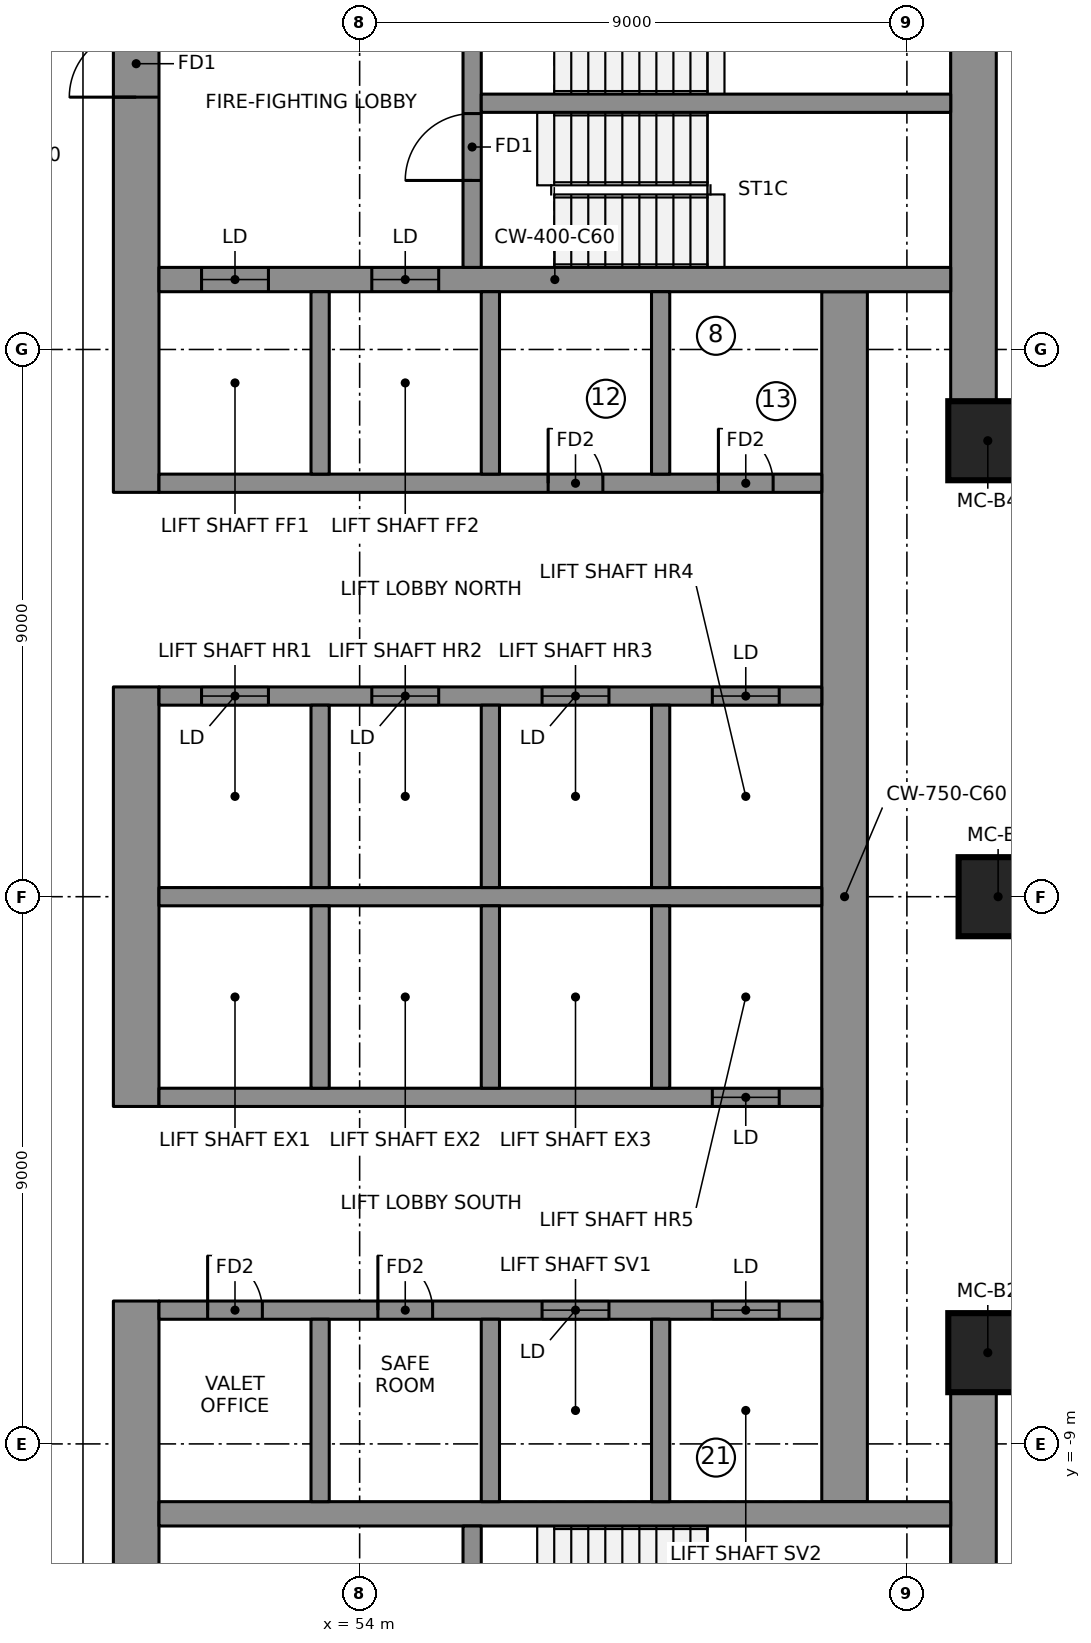
"""IFC4 building model, lengths in metres.
Left out: names, types, materials, properties, quantities, classifications, styles, units other than length and angle.
Written with IfcOpenShell. Run it as: python <this file> out.ifc"""

import sys

from ifc_helpers import new_model, si_unit, direction, frame, frame_2d, origin, origin_2d, place, context, subcontext, project, spatial, rectangle, extrude, element, fill, save


model = new_model("IFC4")
c1 = context("Model", 3, precision=1e-05, world=origin(), true_north=direction((0.0, 1.0)))
c2 = subcontext(c1, "Body", "Model", "MODEL_VIEW")
j1 = project(units=[si_unit("LENGTHUNIT", "METRE"), si_unit("PLANEANGLEUNIT", "RADIAN")], contexts=[c1])
p1 = place(None, origin())
s1 = spatial("IfcSite", under=j1, at=p1, CompositionType="ELEMENT")
p2 = place(p1, origin())
s2 = spatial("IfcBuilding", under=s1, at=p2, CompositionType="ELEMENT")
p3 = place(p2, frame((0.0, 0.0, 207.45)))
s3 = spatial("IfcBuildingStorey", under=s2, at=p3, CompositionType="ELEMENT", Elevation=207.45)
p4 = place(p3, frame((50.325, 6.65, 0.0), z_axis=(0.0, 0.0, 1.0), x_axis=(0.0, 1.0, 0.0)))
e1 = element("IfcWall", 1, at=p4, inside=s3, PredefinedType="SHEAR", context=c2, shape_type="SweptSolid", body=[
    extrude(rectangle(XDim=9.85, YDim=0.75, at=frame_2d((4.925, 0.0))), origin(), (0.0, 0.0, 1.0), 3.55),
])
p5 = place(p4, frame((6.5, 0.0, 0.0)))
e2 = element("IfcOpeningElement", 2, at=p5, cuts=e1, PredefinedType="OPENING", context=c2, shape_type="SweptSolid", body=[
    extrude(rectangle(XDim=1.1, YDim=2.1, at=frame_2d((0.55, 1.05))), frame((0.0, 0.385, 0.0), z_axis=(0.0, -1.0, 0.0), x_axis=(1.0, 0.0, 0.0)), (0.0, 0.0, 1.0), 0.77),
])
p6 = place(p3, frame((50.325, -3.45, 0.0), z_axis=(0.0, 0.0, 1.0), x_axis=(0.0, 1.0, 0.0)))
e3 = element("IfcWall", 3, at=p6, inside=s3, PredefinedType="SHEAR", context=c2, shape_type="SweptSolid", body=[
    extrude(rectangle(XDim=6.9, YDim=0.75, at=frame_2d((3.45, 0.0))), origin(), (0.0, 0.0, 1.0), 3.55),
])
p7 = place(p3, frame((50.325, -16.5, 0.0), z_axis=(0.0, 0.0, 1.0), x_axis=(0.0, 1.0, 0.0)))
e4 = element("IfcWall", 4, at=p7, inside=s3, PredefinedType="SHEAR", context=c2, shape_type="SweptSolid", body=[
    extrude(rectangle(XDim=9.85, YDim=0.75, at=frame_2d((4.925, 0.0))), origin(), (0.0, 0.0, 1.0), 3.55),
])
p8 = place(p7, frame((2.25, 0.0, 0.0)))
e5 = element("IfcOpeningElement", 5, at=p8, cuts=e4, PredefinedType="OPENING", context=c2, shape_type="SweptSolid", body=[
    extrude(rectangle(XDim=1.1, YDim=2.1, at=frame_2d((0.55, 1.05))), frame((0.0, 0.385, 0.0), z_axis=(0.0, -1.0, 0.0), x_axis=(1.0, 0.0, 0.0)), (0.0, 0.0, 1.0), 0.77),
])
for number, where, z_axis, x_axis in (
    (6, (64.095, 8.099, 0.0), (0.0, 0.0, 1.0), (0.0, 1.0, 0.0)),
    (7, (64.095, -15.75, 0.0), (0.0, 0.0, 1.0), (0.0, 1.0, 0.0)),
):
    element("IfcWall", number, at=place(p3, frame(where, z_axis=z_axis, x_axis=x_axis)), inside=s3, PredefinedType="SHEAR", context=c2, shape_type="SweptSolid", body=[
        extrude(rectangle(XDim=7.651, YDim=0.75, at=frame_2d((3.825, 0.0))), origin(), (0.0, 0.0, 1.0), 3.55),
    ])
p9 = place(p3, frame((61.975, -9.95, 0.0), z_axis=(0.0, 0.0, 1.0), x_axis=(0.0, 1.0, 0.0)))
e8 = element("IfcWall", 8, at=p9, inside=s3, PredefinedType="SHEAR", context=c2, shape_type="SweptSolid", body=[
    extrude(rectangle(XDim=19.9, YDim=0.75, at=frame_2d((9.95, 0.0))), origin(), (0.0, 0.0, 1.0), 3.55),
])
p10 = place(p3, frame((50.7, 10.15, 0.0), z_axis=(0.0, 0.0, 1.0), x_axis=(1.0, 0.0, 0.0)))
e9 = element("IfcWall", 9, at=p10, inside=s3, PredefinedType="SHEAR", context=c2, shape_type="SweptSolid", body=[
    extrude(rectangle(XDim=13.02, YDim=0.4, at=frame_2d((6.51, 0.0))), origin(), (0.0, 0.0, 1.0), 3.55),
])
p11 = place(p10, frame((0.7, 0.0, 0.0)))
e10 = element("IfcOpeningElement", 10, at=p11, cuts=e9, PredefinedType="OPENING", context=c2, shape_type="SweptSolid", body=[
    extrude(rectangle(XDim=1.1, YDim=2.1, at=frame_2d((0.55, 1.05))), frame((0.0, 0.21, 0.0), z_axis=(0.0, -1.0, 0.0), x_axis=(1.0, 0.0, 0.0)), (0.0, 0.0, 1.0), 0.42),
])
p12 = place(p10, frame((3.5, 0.0, 0.0)))
e11 = element("IfcOpeningElement", 11, at=p12, cuts=e9, PredefinedType="OPENING", context=c2, shape_type="SweptSolid", body=[
    extrude(rectangle(XDim=1.1, YDim=2.1, at=frame_2d((0.55, 1.05))), frame((0.0, 0.21, 0.0), z_axis=(0.0, -1.0, 0.0), x_axis=(1.0, 0.0, 0.0)), (0.0, 0.0, 1.0), 0.42),
])
p13 = place(p3, frame((50.7, -10.15, 0.0), z_axis=(0.0, 0.0, 1.0), x_axis=(1.0, 0.0, 0.0)))
e12 = element("IfcWall", 12, at=p13, inside=s3, PredefinedType="SHEAR", context=c2, shape_type="SweptSolid", body=[
    extrude(rectangle(XDim=13.02, YDim=0.4, at=frame_2d((6.51, 0.0))), origin(), (0.0, 0.0, 1.0), 3.55),
])
p14 = place(p3, frame((50.7, 0.0, 0.0), z_axis=(0.0, 0.0, 1.0), x_axis=(1.0, 0.0, 0.0)))
e13 = element("IfcWall", 13, at=p14, inside=s3, PredefinedType="SHEAR", context=c2, shape_type="SweptSolid", body=[
    extrude(rectangle(XDim=10.9, YDim=0.3, at=frame_2d((5.45, 0.0))), origin(), (0.0, 0.0, 1.0), 3.55),
])
p15 = place(p3, frame((50.7, 3.3, 0.0), z_axis=(0.0, 0.0, 1.0), x_axis=(1.0, 0.0, 0.0)))
e14 = element("IfcWall", 14, at=p15, inside=s3, PredefinedType="SHEAR", context=c2, shape_type="SweptSolid", body=[
    extrude(rectangle(XDim=10.9, YDim=0.3, at=frame_2d((5.45, 0.0))), origin(), (0.0, 0.0, 1.0), 3.55),
])
p16 = place(p15, frame((0.7, 0.0, 0.0)))
e15 = element("IfcOpeningElement", 15, at=p16, cuts=e14, PredefinedType="OPENING", context=c2, shape_type="SweptSolid", body=[
    extrude(rectangle(XDim=1.1, YDim=2.1, at=frame_2d((0.55, 1.05))), frame((0.0, 0.16, 0.0), z_axis=(0.0, -1.0, 0.0), x_axis=(1.0, 0.0, 0.0)), (0.0, 0.0, 1.0), 0.32),
])
p17 = place(p15, frame((3.5, 0.0, 0.0)))
e16 = element("IfcOpeningElement", 16, at=p17, cuts=e14, PredefinedType="OPENING", context=c2, shape_type="SweptSolid", body=[
    extrude(rectangle(XDim=1.1, YDim=2.1, at=frame_2d((0.55, 1.05))), frame((0.0, 0.16, 0.0), z_axis=(0.0, -1.0, 0.0), x_axis=(1.0, 0.0, 0.0)), (0.0, 0.0, 1.0), 0.32),
])
p18 = place(p15, frame((6.3, 0.0, 0.0)))
e17 = element("IfcOpeningElement", 17, at=p18, cuts=e14, PredefinedType="OPENING", context=c2, shape_type="SweptSolid", body=[
    extrude(rectangle(XDim=1.1, YDim=2.1, at=frame_2d((0.55, 1.05))), frame((0.0, 0.16, 0.0), z_axis=(0.0, -1.0, 0.0), x_axis=(1.0, 0.0, 0.0)), (0.0, 0.0, 1.0), 0.32),
])
p19 = place(p15, frame((9.1, 0.0, 0.0)))
e18 = element("IfcOpeningElement", 18, at=p19, cuts=e14, PredefinedType="OPENING", context=c2, shape_type="SweptSolid", body=[
    extrude(rectangle(XDim=1.1, YDim=2.1, at=frame_2d((0.55, 1.05))), frame((0.0, 0.16, 0.0), z_axis=(0.0, -1.0, 0.0), x_axis=(1.0, 0.0, 0.0)), (0.0, 0.0, 1.0), 0.32),
])
p20 = place(p3, frame((50.7, 6.8, 0.0), z_axis=(0.0, 0.0, 1.0), x_axis=(1.0, 0.0, 0.0)))
e19 = element("IfcWall", 19, at=p20, inside=s3, PredefinedType="SHEAR", context=c2, shape_type="SweptSolid", body=[
    extrude(rectangle(XDim=10.9, YDim=0.3, at=frame_2d((5.45, 0.0))), origin(), (0.0, 0.0, 1.0), 3.55),
])
p21 = place(p20, frame((6.4, 0.0, 0.0)))
e20 = element("IfcOpeningElement", 20, at=p21, cuts=e19, PredefinedType="OPENING", context=c2, shape_type="SweptSolid", body=[
    extrude(rectangle(XDim=0.9, YDim=2.1, at=frame_2d((0.45, 1.05))), frame((0.0, 0.16, 0.0), z_axis=(0.0, -1.0, 0.0), x_axis=(1.0, 0.0, 0.0)), (0.0, 0.0, 1.0), 0.32),
])
p22 = place(p20, frame((9.2, 0.0, 0.0)))
e21 = element("IfcOpeningElement", 21, at=p22, cuts=e19, PredefinedType="OPENING", context=c2, shape_type="SweptSolid", body=[
    extrude(rectangle(XDim=0.9, YDim=2.1, at=frame_2d((0.45, 1.05))), frame((0.0, 0.16, 0.0), z_axis=(0.0, -1.0, 0.0), x_axis=(1.0, 0.0, 0.0)), (0.0, 0.0, 1.0), 0.32),
])
for number, where, z_axis, x_axis in (
    (22, (53.35, 0.15, 0.0), (0.0, 0.0, 1.0), (0.0, 1.0, 0.0)),
    (23, (53.35, 6.95, 0.0), (0.0, 0.0, 1.0), (0.0, 1.0, 0.0)),
    (24, (56.15, 0.15, 0.0), (0.0, 0.0, 1.0), (0.0, 1.0, 0.0)),
    (25, (56.15, 6.95, 0.0), (0.0, 0.0, 1.0), (0.0, 1.0, 0.0)),
    (26, (58.95, 0.15, 0.0), (0.0, 0.0, 1.0), (0.0, 1.0, 0.0)),
    (27, (58.95, 6.95, 0.0), (0.0, 0.0, 1.0), (0.0, 1.0, 0.0)),
):
    element("IfcWall", number, at=place(p3, frame(where, z_axis=z_axis, x_axis=x_axis)), inside=s3, PredefinedType="SHEAR", context=c2, shape_type="SweptSolid", body=[
        extrude(rectangle(XDim=3.0, YDim=0.3, at=frame_2d((1.5, 0.0))), origin(), (0.0, 0.0, 1.0), 3.55),
    ])
p23 = place(p3, frame((50.7, -3.3, 0.0), z_axis=(0.0, 0.0, 1.0), x_axis=(1.0, 0.0, 0.0)))
e28 = element("IfcWall", 28, at=p23, inside=s3, PredefinedType="SHEAR", context=c2, shape_type="SweptSolid", body=[
    extrude(rectangle(XDim=10.9, YDim=0.3, at=frame_2d((5.45, 0.0))), origin(), (0.0, 0.0, 1.0), 3.55),
])
p24 = place(p23, frame((9.1, 0.0, 0.0)))
e29 = element("IfcOpeningElement", 29, at=p24, cuts=e28, PredefinedType="OPENING", context=c2, shape_type="SweptSolid", body=[
    extrude(rectangle(XDim=1.1, YDim=2.1, at=frame_2d((0.55, 1.05))), frame((0.0, 0.16, 0.0), z_axis=(0.0, -1.0, 0.0), x_axis=(1.0, 0.0, 0.0)), (0.0, 0.0, 1.0), 0.32),
])
p25 = place(p3, frame((50.7, -6.8, 0.0), z_axis=(0.0, 0.0, 1.0), x_axis=(1.0, 0.0, 0.0)))
e30 = element("IfcWall", 30, at=p25, inside=s3, PredefinedType="SHEAR", context=c2, shape_type="SweptSolid", body=[
    extrude(rectangle(XDim=10.9, YDim=0.3, at=frame_2d((5.45, 0.0))), origin(), (0.0, 0.0, 1.0), 3.55),
])
p26 = place(p25, frame((6.3, 0.0, 0.0)))
e31 = element("IfcOpeningElement", 31, at=p26, cuts=e30, PredefinedType="OPENING", context=c2, shape_type="SweptSolid", body=[
    extrude(rectangle(XDim=1.1, YDim=2.1, at=frame_2d((0.55, 1.05))), frame((0.0, 0.16, 0.0), z_axis=(0.0, -1.0, 0.0), x_axis=(1.0, 0.0, 0.0)), (0.0, 0.0, 1.0), 0.32),
])
p27 = place(p25, frame((9.1, 0.0, 0.0)))
e32 = element("IfcOpeningElement", 32, at=p27, cuts=e30, PredefinedType="OPENING", context=c2, shape_type="SweptSolid", body=[
    extrude(rectangle(XDim=1.1, YDim=2.1, at=frame_2d((0.55, 1.05))), frame((0.0, 0.16, 0.0), z_axis=(0.0, -1.0, 0.0), x_axis=(1.0, 0.0, 0.0)), (0.0, 0.0, 1.0), 0.32),
])
p28 = place(p25, frame((0.8, 0.0, 0.0)))
e33 = element("IfcOpeningElement", 33, at=p28, cuts=e30, PredefinedType="OPENING", context=c2, shape_type="SweptSolid", body=[
    extrude(rectangle(XDim=0.9, YDim=2.1, at=frame_2d((0.45, 1.05))), frame((0.0, 0.16, 0.0), z_axis=(0.0, -1.0, 0.0), x_axis=(1.0, 0.0, 0.0)), (0.0, 0.0, 1.0), 0.32),
])
p29 = place(p25, frame((3.6, 0.0, 0.0)))
e34 = element("IfcOpeningElement", 34, at=p29, cuts=e30, PredefinedType="OPENING", context=c2, shape_type="SweptSolid", body=[
    extrude(rectangle(XDim=0.9, YDim=2.1, at=frame_2d((0.45, 1.05))), frame((0.0, 0.16, 0.0), z_axis=(0.0, -1.0, 0.0), x_axis=(1.0, 0.0, 0.0)), (0.0, 0.0, 1.0), 0.32),
])
for number, where, z_axis, x_axis in (
    (35, (53.35, -3.15, 0.0), (0.0, 0.0, 1.0), (0.0, 1.0, 0.0)),
    (36, (53.35, -9.95, 0.0), (0.0, 0.0, 1.0), (0.0, 1.0, 0.0)),
    (37, (56.15, -3.15, 0.0), (0.0, 0.0, 1.0), (0.0, 1.0, 0.0)),
    (38, (56.15, -9.95, 0.0), (0.0, 0.0, 1.0), (0.0, 1.0, 0.0)),
    (39, (58.95, -3.15, 0.0), (0.0, 0.0, 1.0), (0.0, 1.0, 0.0)),
    (40, (58.95, -9.95, 0.0), (0.0, 0.0, 1.0), (0.0, 1.0, 0.0)),
):
    element("IfcWall", number, at=place(p3, frame(where, z_axis=z_axis, x_axis=x_axis)), inside=s3, PredefinedType="SHEAR", context=c2, shape_type="SweptSolid", body=[
        extrude(rectangle(XDim=3.0, YDim=0.3, at=frame_2d((1.5, 0.0))), origin(), (0.0, 0.0, 1.0), 3.55),
    ])
p30 = place(p3, frame((55.85, 10.35, 0.0), z_axis=(0.0, 0.0, 1.0), x_axis=(0.0, 1.0, 0.0)))
e41 = element("IfcWall", 41, at=p30, inside=s3, PredefinedType="SHEAR", context=c2, shape_type="SweptSolid", body=[
    extrude(rectangle(XDim=5.4, YDim=0.3, at=frame_2d((2.7, 0.0))), origin(), (0.0, 0.0, 1.0), 3.55),
])
p31 = place(p30, frame((1.43, 0.0, 0.0)))
e42 = element("IfcOpeningElement", 42, at=p31, cuts=e41, PredefinedType="OPENING", context=c2, shape_type="SweptSolid", body=[
    extrude(rectangle(XDim=1.1, YDim=2.1, at=frame_2d((0.55, 1.05))), frame((0.0, 0.16, 0.0), z_axis=(0.0, -1.0, 0.0), x_axis=(1.0, 0.0, 0.0)), (0.0, 0.0, 1.0), 0.32),
])
p32 = place(p30, frame((3.6, 0.0, 0.0)))
e43 = element("IfcOpeningElement", 43, at=p32, cuts=e41, PredefinedType="OPENING", context=c2, shape_type="SweptSolid", body=[
    extrude(rectangle(XDim=1.1, YDim=2.1, at=frame_2d((0.55, 1.05))), frame((0.0, 0.16, 0.0), z_axis=(0.0, -1.0, 0.0), x_axis=(1.0, 0.0, 0.0)), (0.0, 0.0, 1.0), 0.32),
])
p33 = place(p3, frame((55.85, -15.75, 0.0), z_axis=(0.0, 0.0, 1.0), x_axis=(0.0, 1.0, 0.0)))
e44 = element("IfcWall", 44, at=p33, inside=s3, PredefinedType="SHEAR", context=c2, shape_type="SweptSolid", body=[
    extrude(rectangle(XDim=5.4, YDim=0.3, at=frame_2d((2.7, 0.0))), origin(), (0.0, 0.0, 1.0), 3.55),
])
p34 = place(p33, frame((3.6, 0.0, 0.0)))
e45 = element("IfcOpeningElement", 45, at=p34, cuts=e44, PredefinedType="OPENING", context=c2, shape_type="SweptSolid", body=[
    extrude(rectangle(XDim=1.1, YDim=2.1, at=frame_2d((0.55, 1.05))), frame((0.0, 0.16, 0.0), z_axis=(0.0, -1.0, 0.0), x_axis=(1.0, 0.0, 0.0)), (0.0, 0.0, 1.0), 0.32),
])
p35 = place(p33, frame((0.8, 0.0, 0.0)))
e46 = element("IfcOpeningElement", 46, at=p35, cuts=e44, PredefinedType="OPENING", context=c2, shape_type="SweptSolid", body=[
    extrude(rectangle(XDim=0.9, YDim=2.1, at=frame_2d((0.45, 1.05))), frame((0.0, 0.16, 0.0), z_axis=(0.0, -1.0, 0.0), x_axis=(1.0, 0.0, 0.0)), (0.0, 0.0, 1.0), 0.32),
])
p36 = place(p3, frame((56.0, 13.05, 0.0), z_axis=(0.0, 0.0, 1.0), x_axis=(1.0, 0.0, 0.0)))
e47 = element("IfcWall", 47, at=p36, inside=s3, PredefinedType="SHEAR", context=c2, shape_type="SweptSolid", body=[
    extrude(rectangle(XDim=7.72, YDim=0.3, at=frame_2d((3.86, 0.0))), origin(), (0.0, 0.0, 1.0), 3.55),
])
for number, where, z_axis, x_axis in (
    (48, (64.33, -7.499, 0.0), (0.0, 0.0, 1.0), (1.0, 0.0, 0.0)),
    (49, (64.5, 0.0, 0.0), (0.0, 0.0, 1.0), (1.0, 0.0, 0.0)),
    (50, (64.33, 7.499, 0.0), (0.0, 0.0, 1.0), (1.0, 0.0, 0.0)),
):
    element("IfcColumn", number, at=place(p3, frame(where, z_axis=z_axis, x_axis=x_axis)), inside=s3, PredefinedType="COLUMN", context=c2, shape_type="SweptSolid", body=[
        extrude(rectangle(XDim=1.3, YDim=1.3, at=origin_2d()), origin(), (0.0, 0.0, 1.0), 3.55),
    ])
p37 = place(p11, origin())
e51 = element("IfcDoor", 51, at=p37, inside=s3, OperationType="DOUBLE_DOOR_SLIDING", PredefinedType="DOOR", context=c2, shape_type="SweptSolid", body=[
    extrude(rectangle(XDim=1.1, YDim=2.1, at=frame_2d((0.55, 1.05))), frame((0.0, 0.025, 0.0), z_axis=(0.0, -1.0, 0.0), x_axis=(1.0, 0.0, 0.0)), (0.0, 0.0, 1.0), 0.05),
])
fill(e10, e51)
p38 = place(p12, origin())
e52 = element("IfcDoor", 52, at=p38, inside=s3, OperationType="DOUBLE_DOOR_SLIDING", PredefinedType="DOOR", context=c2, shape_type="SweptSolid", body=[
    extrude(rectangle(XDim=1.1, YDim=2.1, at=frame_2d((0.55, 1.05))), frame((0.0, 0.025, 0.0), z_axis=(0.0, -1.0, 0.0), x_axis=(1.0, 0.0, 0.0)), (0.0, 0.0, 1.0), 0.05),
])
fill(e11, e52)
p39 = place(p16, origin())
e53 = element("IfcDoor", 53, at=p39, inside=s3, OperationType="DOUBLE_DOOR_SLIDING", PredefinedType="DOOR", context=c2, shape_type="SweptSolid", body=[
    extrude(rectangle(XDim=1.1, YDim=2.1, at=frame_2d((0.55, 1.05))), frame((0.0, 0.025, 0.0), z_axis=(0.0, -1.0, 0.0), x_axis=(1.0, 0.0, 0.0)), (0.0, 0.0, 1.0), 0.05),
])
fill(e15, e53)
p40 = place(p17, origin())
e54 = element("IfcDoor", 54, at=p40, inside=s3, OperationType="DOUBLE_DOOR_SLIDING", PredefinedType="DOOR", context=c2, shape_type="SweptSolid", body=[
    extrude(rectangle(XDim=1.1, YDim=2.1, at=frame_2d((0.55, 1.05))), frame((0.0, 0.025, 0.0), z_axis=(0.0, -1.0, 0.0), x_axis=(1.0, 0.0, 0.0)), (0.0, 0.0, 1.0), 0.05),
])
fill(e16, e54)
p41 = place(p18, origin())
e55 = element("IfcDoor", 55, at=p41, inside=s3, OperationType="DOUBLE_DOOR_SLIDING", PredefinedType="DOOR", context=c2, shape_type="SweptSolid", body=[
    extrude(rectangle(XDim=1.1, YDim=2.1, at=frame_2d((0.55, 1.05))), frame((0.0, 0.025, 0.0), z_axis=(0.0, -1.0, 0.0), x_axis=(1.0, 0.0, 0.0)), (0.0, 0.0, 1.0), 0.05),
])
fill(e17, e55)
p42 = place(p19, origin())
e56 = element("IfcDoor", 56, at=p42, inside=s3, OperationType="DOUBLE_DOOR_SLIDING", PredefinedType="DOOR", context=c2, shape_type="SweptSolid", body=[
    extrude(rectangle(XDim=1.1, YDim=2.1, at=frame_2d((0.55, 1.05))), frame((0.0, 0.025, 0.0), z_axis=(0.0, -1.0, 0.0), x_axis=(1.0, 0.0, 0.0)), (0.0, 0.0, 1.0), 0.05),
])
fill(e18, e56)
p43 = place(p24, origin())
e57 = element("IfcDoor", 57, at=p43, inside=s3, OperationType="DOUBLE_DOOR_SLIDING", PredefinedType="DOOR", context=c2, shape_type="SweptSolid", body=[
    extrude(rectangle(XDim=1.1, YDim=2.1, at=frame_2d((0.55, 1.05))), frame((0.0, 0.025, 0.0), z_axis=(0.0, -1.0, 0.0), x_axis=(1.0, 0.0, 0.0)), (0.0, 0.0, 1.0), 0.05),
])
fill(e29, e57)
p44 = place(p26, origin())
e58 = element("IfcDoor", 58, at=p44, inside=s3, OperationType="DOUBLE_DOOR_SLIDING", PredefinedType="DOOR", context=c2, shape_type="SweptSolid", body=[
    extrude(rectangle(XDim=1.1, YDim=2.1, at=frame_2d((0.55, 1.05))), frame((0.0, 0.025, 0.0), z_axis=(0.0, -1.0, 0.0), x_axis=(1.0, 0.0, 0.0)), (0.0, 0.0, 1.0), 0.05),
])
fill(e31, e58)
p45 = place(p27, origin())
e59 = element("IfcDoor", 59, at=p45, inside=s3, OperationType="DOUBLE_DOOR_SLIDING", PredefinedType="DOOR", context=c2, shape_type="SweptSolid", body=[
    extrude(rectangle(XDim=1.1, YDim=2.1, at=frame_2d((0.55, 1.05))), frame((0.0, 0.025, 0.0), z_axis=(0.0, -1.0, 0.0), x_axis=(1.0, 0.0, 0.0)), (0.0, 0.0, 1.0), 0.05),
])
fill(e32, e59)
p46 = place(p31, origin())
e60 = element("IfcDoor", 60, at=p46, inside=s3, OperationType="SINGLE_SWING_RIGHT", PredefinedType="DOOR", context=c2, shape_type="SweptSolid", body=[
    extrude(rectangle(XDim=1.1, YDim=2.1, at=frame_2d((0.55, 1.05))), frame((0.0, 0.025, 0.0), z_axis=(0.0, -1.0, 0.0), x_axis=(1.0, 0.0, 0.0)), (0.0, 0.0, 1.0), 0.05),
])
fill(e42, e60)
p47 = place(p5, origin())
e61 = element("IfcDoor", 61, at=p47, inside=s3, OperationType="SINGLE_SWING_RIGHT", PredefinedType="DOOR", context=c2, shape_type="SweptSolid", body=[
    extrude(rectangle(XDim=1.1, YDim=2.1, at=frame_2d((0.55, 1.05))), frame((0.0, 0.025, 0.0), z_axis=(0.0, -1.0, 0.0), x_axis=(1.0, 0.0, 0.0)), (0.0, 0.0, 1.0), 0.05),
])
fill(e2, e61)
p48 = place(p21, origin())
e62 = element("IfcDoor", 62, at=p48, inside=s3, OperationType="SINGLE_SWING_LEFT", PredefinedType="DOOR", context=c2, shape_type="SweptSolid", body=[
    extrude(rectangle(XDim=0.9, YDim=2.1, at=frame_2d((0.45, 1.05))), frame((0.0, 0.025, 0.0), z_axis=(0.0, -1.0, 0.0), x_axis=(1.0, 0.0, 0.0)), (0.0, 0.0, 1.0), 0.05),
])
fill(e20, e62)
p49 = place(p22, origin())
e63 = element("IfcDoor", 63, at=p49, inside=s3, OperationType="SINGLE_SWING_LEFT", PredefinedType="DOOR", context=c2, shape_type="SweptSolid", body=[
    extrude(rectangle(XDim=0.9, YDim=2.1, at=frame_2d((0.45, 1.05))), frame((0.0, 0.025, 0.0), z_axis=(0.0, -1.0, 0.0), x_axis=(1.0, 0.0, 0.0)), (0.0, 0.0, 1.0), 0.05),
])
fill(e21, e63)
p50 = place(p28, origin())
e64 = element("IfcDoor", 64, at=p50, inside=s3, OperationType="SINGLE_SWING_LEFT", PredefinedType="DOOR", context=c2, shape_type="SweptSolid", body=[
    extrude(rectangle(XDim=0.9, YDim=2.1, at=frame_2d((0.45, 1.05))), frame((0.0, 0.025, 0.0), z_axis=(0.0, -1.0, 0.0), x_axis=(1.0, 0.0, 0.0)), (0.0, 0.0, 1.0), 0.05),
])
fill(e33, e64)
p51 = place(p29, origin())
e65 = element("IfcDoor", 65, at=p51, inside=s3, OperationType="SINGLE_SWING_LEFT", PredefinedType="DOOR", context=c2, shape_type="SweptSolid", body=[
    extrude(rectangle(XDim=0.9, YDim=2.1, at=frame_2d((0.45, 1.05))), frame((0.0, 0.025, 0.0), z_axis=(0.0, -1.0, 0.0), x_axis=(1.0, 0.0, 0.0)), (0.0, 0.0, 1.0), 0.05),
])
fill(e34, e65)
save(model, sys.argv[1])
